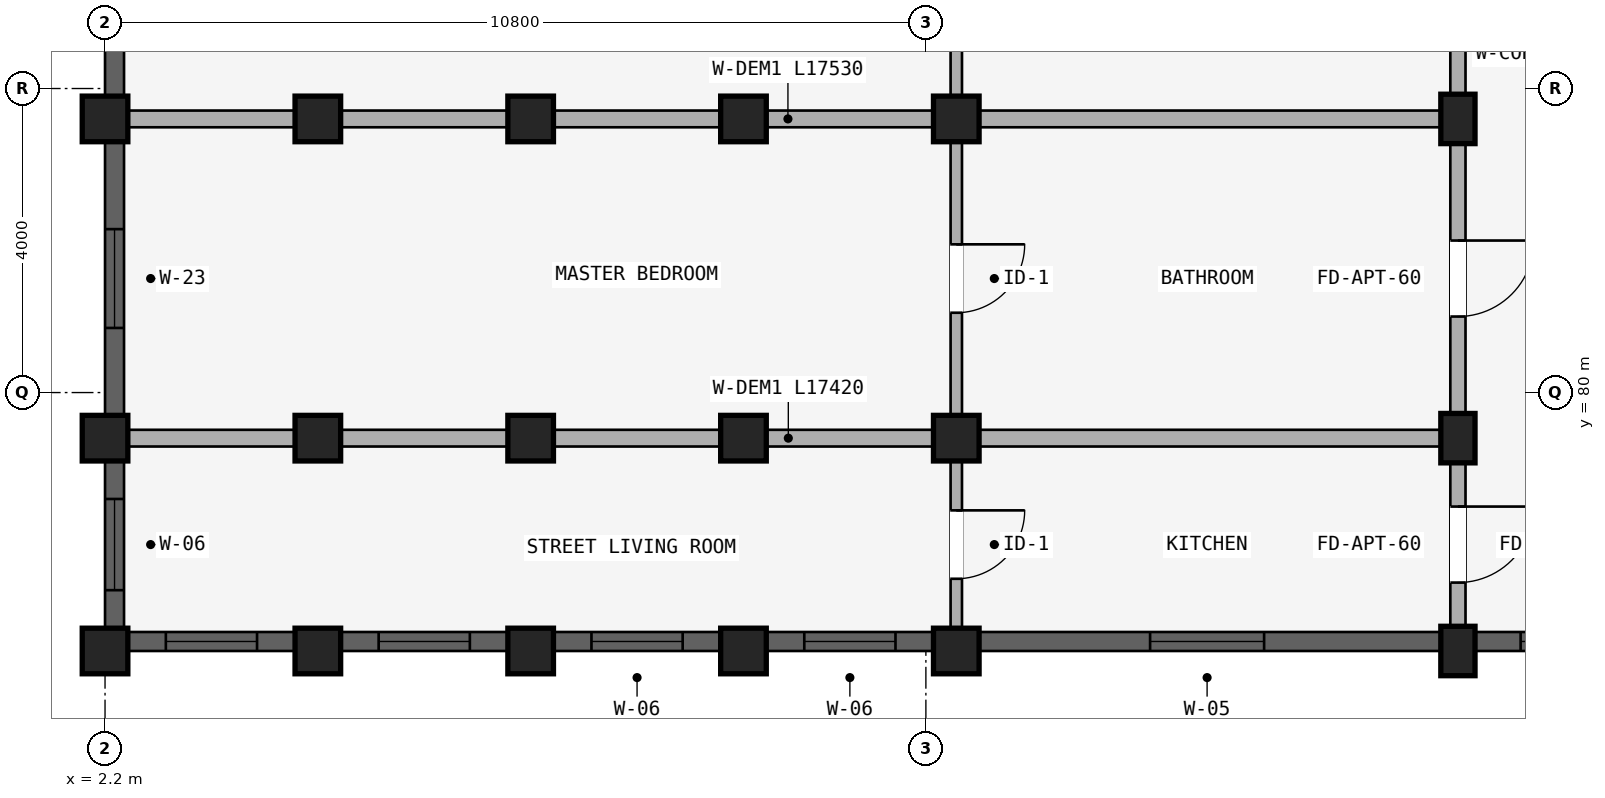
"""IFC4 building model, lengths in metres.
Left out: names, types, materials, properties, quantities, classifications, styles, units other than length and angle.
Written with IfcOpenShell. Run it as: python <this file> out.ifc"""

import sys

from ifc_helpers import new_model, si_unit, direction, frame, frame_2d, origin, origin_2d, place, context, subcontext, project, spatial, rectangle, extrude, element, fill, save


model = new_model("IFC4")
c1 = context("Model", 3, precision=1e-05, world=origin(), true_north=direction((0.0, 1.0)))
c2 = subcontext(c1, "Body", "Model", "MODEL_VIEW")
j1 = project(units=[si_unit("LENGTHUNIT", "METRE"), si_unit("PLANEANGLEUNIT", "RADIAN")], contexts=[c1])
p1 = place(None, origin())
s1 = spatial("IfcSite", under=j1, at=p1, CompositionType="ELEMENT")
p2 = place(p1, origin())
s2 = spatial("IfcBuilding", under=s1, at=p2, CompositionType="ELEMENT")
p3 = place(p2, frame((0.0, 0.0, 30.75)))
s3 = spatial("IfcBuildingStorey", under=s2, at=p3, CompositionType="ELEMENT", Elevation=30.75)
p4 = place(p3, frame((20.0, 83.6, 0.0), z_axis=(0.0, 0.0, 1.0), x_axis=(1.0, 0.0, 0.0)))
e1 = element("IfcColumn", 1, at=p4, inside=s3, PredefinedType="COLUMN", context=c2, shape_type="SweptSolid", body=[
    extrude(rectangle(XDim=0.45, YDim=0.65, at=origin_2d()), origin(), (0.0, 0.0, 1.0), 2.93),
])
for number, where, z_axis, x_axis in (
    (2, (13.4, 83.6, 0.0), (0.0, 0.0, 1.0), (1.0, 0.0, 0.0)),
    (3, (10.6, 83.6, 0.0), (0.0, 0.0, 1.0), (1.0, 0.0, 0.0)),
    (4, (7.8, 83.6, 0.0), (0.0, 0.0, 1.0), (1.0, 0.0, 0.0)),
    (5, (5.0, 83.6, 0.0), (0.0, 0.0, 1.0), (1.0, 0.0, 0.0)),
    (6, (2.2, 83.6, 0.0), (0.0, 0.0, 1.0), (1.0, 0.0, 0.0)),
):
    element("IfcColumn", number, at=place(p3, frame(where, z_axis=z_axis, x_axis=x_axis)), inside=s3, PredefinedType="COLUMN", context=c2, shape_type="SweptSolid", body=[
        extrude(rectangle(XDim=0.6, YDim=0.6, at=origin_2d()), origin(), (0.0, 0.0, 1.0), 2.93),
    ])
p5 = place(p3, frame((20.0, 79.4, 0.0), z_axis=(0.0, 0.0, 1.0), x_axis=(1.0, 0.0, 0.0)))
e7 = element("IfcColumn", 7, at=p5, inside=s3, PredefinedType="COLUMN", context=c2, shape_type="SweptSolid", body=[
    extrude(rectangle(XDim=0.45, YDim=0.65, at=origin_2d()), origin(), (0.0, 0.0, 1.0), 2.93),
])
for number, where, z_axis, x_axis in (
    (8, (13.4, 79.4, 0.0), (0.0, 0.0, 1.0), (1.0, 0.0, 0.0)),
    (9, (10.6, 79.4, 0.0), (0.0, 0.0, 1.0), (1.0, 0.0, 0.0)),
    (10, (7.8, 79.4, 0.0), (0.0, 0.0, 1.0), (1.0, 0.0, 0.0)),
    (11, (5.0, 79.4, 0.0), (0.0, 0.0, 1.0), (1.0, 0.0, 0.0)),
    (12, (2.2, 79.4, 0.0), (0.0, 0.0, 1.0), (1.0, 0.0, 0.0)),
):
    element("IfcColumn", number, at=place(p3, frame(where, z_axis=z_axis, x_axis=x_axis)), inside=s3, PredefinedType="COLUMN", context=c2, shape_type="SweptSolid", body=[
        extrude(rectangle(XDim=0.6, YDim=0.6, at=origin_2d()), origin(), (0.0, 0.0, 1.0), 2.93),
    ])
p6 = place(p3, frame((20.0, 76.6, 0.0), z_axis=(0.0, 0.0, 1.0), x_axis=(1.0, 0.0, 0.0)))
e13 = element("IfcColumn", 13, at=p6, inside=s3, PredefinedType="COLUMN", context=c2, shape_type="SweptSolid", body=[
    extrude(rectangle(XDim=0.45, YDim=0.65, at=origin_2d()), origin(), (0.0, 0.0, 1.0), 2.93),
])
for number, where, z_axis, x_axis in (
    (14, (13.4, 76.6, 0.0), (0.0, 0.0, 1.0), (1.0, 0.0, 0.0)),
    (15, (10.6, 76.6, 0.0), (0.0, 0.0, 1.0), (1.0, 0.0, 0.0)),
    (16, (7.8, 76.6, 0.0), (0.0, 0.0, 1.0), (1.0, 0.0, 0.0)),
    (17, (5.0, 76.6, 0.0), (0.0, 0.0, 1.0), (1.0, 0.0, 0.0)),
    (18, (2.2, 76.6, 0.0), (0.0, 0.0, 1.0), (1.0, 0.0, 0.0)),
):
    element("IfcColumn", number, at=place(p3, frame(where, z_axis=z_axis, x_axis=x_axis)), inside=s3, PredefinedType="COLUMN", context=c2, shape_type="SweptSolid", body=[
        extrude(rectangle(XDim=0.6, YDim=0.6, at=origin_2d()), origin(), (0.0, 0.0, 1.0), 2.93),
    ])
p7 = place(p3, frame((20.0, 87.65, 0.0), z_axis=(0.0, 0.0, 1.0), x_axis=(0.0, -1.0, 0.0)))
e19 = element("IfcWall", 19, at=p7, inside=s3, PredefinedType="STANDARD", context=c2, shape_type="SweptSolid", body=[
    extrude(rectangle(XDim=4.05, YDim=0.2, at=frame_2d((2.025, 0.0))), origin(), (0.0, 0.0, 1.0), 2.372),
])
p8 = place(p7, frame((1.525, 0.0, 0.0)))
e20 = element("IfcOpeningElement", 20, at=p8, cuts=e19, PredefinedType="OPENING", context=c2, shape_type="SweptSolid", body=[
    extrude(rectangle(XDim=1.0, YDim=2.15, at=frame_2d((0.5, 1.075))), frame((0.0, 0.11, 0.0), z_axis=(0.0, -1.0, 0.0), x_axis=(1.0, 0.0, 0.0)), (0.0, 0.0, 1.0), 0.22),
])
p9 = place(p3, frame((13.4, 87.57, 0.0), z_axis=(0.0, 0.0, 1.0), x_axis=(0.0, -1.0, 0.0)))
e21 = element("IfcWall", 21, at=p9, inside=s3, PredefinedType="PARTITIONING", context=c2, shape_type="SweptSolid", body=[
    extrude(rectangle(XDim=3.89, YDim=0.15, at=frame_2d((1.945, 0.0))), origin(), (0.0, 0.0, 1.0), 2.372),
])
p10 = place(p9, frame((1.495, 0.0, 0.0)))
e22 = element("IfcOpeningElement", 22, at=p10, cuts=e21, PredefinedType="OPENING", context=c2, shape_type="SweptSolid", body=[
    extrude(rectangle(XDim=0.9, YDim=2.1, at=frame_2d((0.45, 1.05))), frame((0.0, 0.085, 0.0), z_axis=(0.0, -1.0, 0.0), x_axis=(1.0, 0.0, 0.0)), (0.0, 0.0, 1.0), 0.17),
])
p11 = place(p3, frame((20.0, 83.6, 0.0), z_axis=(0.0, 0.0, 1.0), x_axis=(0.0, -1.0, 0.0)))
e23 = element("IfcWall", 23, at=p11, inside=s3, PredefinedType="STANDARD", context=c2, shape_type="SweptSolid", body=[
    extrude(rectangle(XDim=4.2, YDim=0.2, at=frame_2d((2.1, 0.0))), origin(), (0.0, 0.0, 1.0), 2.372),
])
p12 = place(p11, frame((1.6, 0.0, 0.0)))
e24 = element("IfcOpeningElement", 24, at=p12, cuts=e23, PredefinedType="OPENING", context=c2, shape_type="SweptSolid", body=[
    extrude(rectangle(XDim=1.0, YDim=2.15, at=frame_2d((0.5, 1.075))), frame((0.0, 0.11, 0.0), z_axis=(0.0, -1.0, 0.0), x_axis=(1.0, 0.0, 0.0)), (0.0, 0.0, 1.0), 0.22),
])
p13 = place(p3, frame((13.4, 83.52, 0.0), z_axis=(0.0, 0.0, 1.0), x_axis=(0.0, -1.0, 0.0)))
e25 = element("IfcWall", 25, at=p13, inside=s3, PredefinedType="PARTITIONING", context=c2, shape_type="SweptSolid", body=[
    extrude(rectangle(XDim=4.04, YDim=0.15, at=frame_2d((2.02, 0.0))), origin(), (0.0, 0.0, 1.0), 2.372),
])
p14 = place(p13, frame((1.57, 0.0, 0.0)))
e26 = element("IfcOpeningElement", 26, at=p14, cuts=e25, PredefinedType="OPENING", context=c2, shape_type="SweptSolid", body=[
    extrude(rectangle(XDim=0.9, YDim=2.1, at=frame_2d((0.45, 1.05))), frame((0.0, 0.085, 0.0), z_axis=(0.0, -1.0, 0.0), x_axis=(1.0, 0.0, 0.0)), (0.0, 0.0, 1.0), 0.17),
])
p15 = place(p3, frame((19.95, 83.6, 0.0), z_axis=(0.0, 0.0, 1.0), x_axis=(-1.0, 0.0, 0.0)))
e27 = element("IfcWall", 27, at=p15, inside=s3, PredefinedType="STANDARD", context=c2, shape_type="SweptSolid", body=[
    extrude(rectangle(XDim=17.53, YDim=0.22, at=frame_2d((8.765, 0.0))), origin(), (0.0, 0.0, 1.0), 2.372),
])
p16 = place(p3, frame((20.0, 79.4, 0.0), z_axis=(0.0, 0.0, 1.0), x_axis=(0.0, -1.0, 0.0)))
e28 = element("IfcWall", 28, at=p16, inside=s3, PredefinedType="STANDARD", context=c2, shape_type="SweptSolid", body=[
    extrude(rectangle(XDim=2.8, YDim=0.2, at=frame_2d((1.4, 0.0))), origin(), (0.0, 0.0, 1.0), 2.372),
])
p17 = place(p16, frame((0.9, 0.0, 0.0)))
e29 = element("IfcOpeningElement", 29, at=p17, cuts=e28, PredefinedType="OPENING", context=c2, shape_type="SweptSolid", body=[
    extrude(rectangle(XDim=1.0, YDim=2.15, at=frame_2d((0.5, 1.075))), frame((0.0, 0.11, 0.0), z_axis=(0.0, -1.0, 0.0), x_axis=(1.0, 0.0, 0.0)), (0.0, 0.0, 1.0), 0.22),
])
p18 = place(p3, frame((13.4, 79.32, 0.0), z_axis=(0.0, 0.0, 1.0), x_axis=(0.0, -1.0, 0.0)))
e30 = element("IfcWall", 30, at=p18, inside=s3, PredefinedType="PLUMBINGWALL", context=c2, shape_type="SweptSolid", body=[
    extrude(rectangle(XDim=2.64, YDim=0.15, at=frame_2d((1.32, 0.0))), origin(), (0.0, 0.0, 1.0), 2.372),
])
p19 = place(p18, frame((0.87, 0.0, 0.0)))
e31 = element("IfcOpeningElement", 31, at=p19, cuts=e30, PredefinedType="OPENING", context=c2, shape_type="SweptSolid", body=[
    extrude(rectangle(XDim=0.9, YDim=2.1, at=frame_2d((0.45, 1.05))), frame((0.0, 0.085, 0.0), z_axis=(0.0, -1.0, 0.0), x_axis=(1.0, 0.0, 0.0)), (0.0, 0.0, 1.0), 0.17),
])
p20 = place(p3, frame((19.9, 79.4, 0.0), z_axis=(0.0, 0.0, 1.0), x_axis=(-1.0, 0.0, 0.0)))
e32 = element("IfcWall", 32, at=p20, inside=s3, PredefinedType="STANDARD", context=c2, shape_type="SweptSolid", body=[
    extrude(rectangle(XDim=17.42, YDim=0.22, at=frame_2d((8.71, 0.0))), origin(), (0.0, 0.0, 1.0), 2.372),
])
p21 = place(p3, frame((2.325, 87.497, 0.0), z_axis=(0.0, 0.0, 1.0), x_axis=(0.0, -1.0, 0.0)))
e33 = element("IfcWall", 33, at=p21, inside=s3, PredefinedType="STANDARD", context=c2, shape_type="SweptSolid", body=[
    extrude(rectangle(XDim=3.593, YDim=0.25, at=frame_2d((1.796, 0.0))), origin(), (0.0, 0.0, 1.0), 2.472),
])
p22 = place(p21, frame((1.146, 0.0, 0.88)))
e34 = element("IfcOpeningElement", 34, at=p22, cuts=e33, PredefinedType="OPENING", context=c2, shape_type="SweptSolid", body=[
    extrude(rectangle(XDim=1.3, YDim=1.4, at=frame_2d((0.65, 0.7))), frame((0.0, 0.135, 0.0), z_axis=(0.0, -1.0, 0.0), x_axis=(1.0, 0.0, 0.0)), (0.0, 0.0, 1.0), 0.27),
])
p23 = place(p3, frame((2.325, 83.296, 0.0), z_axis=(0.0, 0.0, 1.0), x_axis=(0.0, -1.0, 0.0)))
e35 = element("IfcWall", 35, at=p23, inside=s3, PredefinedType="STANDARD", context=c2, shape_type="SweptSolid", body=[
    extrude(rectangle(XDim=3.593, YDim=0.25, at=frame_2d((1.796, 0.0))), origin(), (0.0, 0.0, 1.0), 2.472),
])
p24 = place(p23, frame((1.146, 0.0, 0.88)))
e36 = element("IfcOpeningElement", 36, at=p24, cuts=e35, PredefinedType="OPENING", context=c2, shape_type="SweptSolid", body=[
    extrude(rectangle(XDim=1.3, YDim=1.4, at=frame_2d((0.65, 0.7))), frame((0.0, 0.135, 0.0), z_axis=(0.0, -1.0, 0.0), x_axis=(1.0, 0.0, 0.0)), (0.0, 0.0, 1.0), 0.27),
])
p25 = place(p3, frame((2.325, 79.096, 0.0), z_axis=(0.0, 0.0, 1.0), x_axis=(0.0, -1.0, 0.0)))
e37 = element("IfcWall", 37, at=p25, inside=s3, PredefinedType="STANDARD", context=c2, shape_type="SweptSolid", body=[
    extrude(rectangle(XDim=2.193, YDim=0.25, at=frame_2d((1.096, 0.0))), origin(), (0.0, 0.0, 1.0), 2.472),
])
p26 = place(p25, frame((0.497, 0.0, 0.772)))
e38 = element("IfcOpeningElement", 38, at=p26, cuts=e37, PredefinedType="OPENING", context=c2, shape_type="SweptSolid", body=[
    extrude(rectangle(XDim=1.2, YDim=1.5, at=frame_2d((0.6, 0.75))), frame((0.0, 0.135, 0.0), z_axis=(0.0, -1.0, 0.0), x_axis=(1.0, 0.0, 0.0)), (0.0, 0.0, 1.0), 0.27),
])
p27 = place(p3, frame((22.171, 76.725, 0.0), z_axis=(0.0, 0.0, 1.0), x_axis=(-1.0, 0.0, 0.0)))
e39 = element("IfcWall", 39, at=p27, inside=s3, PredefinedType="STANDARD", context=c2, shape_type="SweptSolid", body=[
    extrude(rectangle(XDim=1.943, YDim=0.25, at=frame_2d((0.971, 0.0))), origin(), (0.0, 0.0, 1.0), 2.372),
])
p28 = place(p27, frame((0.596, 0.0, 0.88)))
e40 = element("IfcOpeningElement", 40, at=p28, cuts=e39, PredefinedType="OPENING", context=c2, shape_type="SweptSolid", body=[
    extrude(rectangle(XDim=0.75, YDim=1.05, at=frame_2d((0.375, 0.525))), frame((0.0, 0.135, 0.0), z_axis=(0.0, -1.0, 0.0), x_axis=(1.0, 0.0, 0.0)), (0.0, 0.0, 1.0), 0.27),
])
p29 = place(p3, frame((19.771, 76.725, 0.0), z_axis=(0.0, 0.0, 1.0), x_axis=(-1.0, 0.0, 0.0)))
e41 = element("IfcWall", 41, at=p29, inside=s3, PredefinedType="STANDARD", context=c2, shape_type="SweptSolid", body=[
    extrude(rectangle(XDim=6.068, YDim=0.25, at=frame_2d((3.034, 0.0))), origin(), (0.0, 0.0, 1.0), 2.372),
])
p30 = place(p29, frame((2.322, 0.0, 0.522)))
e42 = element("IfcOpeningElement", 42, at=p30, cuts=e41, PredefinedType="OPENING", context=c2, shape_type="SweptSolid", body=[
    extrude(rectangle(XDim=1.5, YDim=1.65, at=frame_2d((0.75, 0.825))), frame((0.0, 0.135, 0.0), z_axis=(0.0, -1.0, 0.0), x_axis=(1.0, 0.0, 0.0)), (0.0, 0.0, 1.0), 0.27),
])
p31 = place(p3, frame((13.096, 76.725, 0.0), z_axis=(0.0, 0.0, 1.0), x_axis=(-1.0, 0.0, 0.0)))
e43 = element("IfcWall", 43, at=p31, inside=s3, PredefinedType="STANDARD", context=c2, shape_type="SweptSolid", body=[
    extrude(rectangle(XDim=2.193, YDim=0.25, at=frame_2d((1.096, 0.0))), origin(), (0.0, 0.0, 1.0), 2.372),
])
p32 = place(p31, frame((0.497, 0.0, 0.672)))
e44 = element("IfcOpeningElement", 44, at=p32, cuts=e43, PredefinedType="OPENING", context=c2, shape_type="SweptSolid", body=[
    extrude(rectangle(XDim=1.2, YDim=1.5, at=frame_2d((0.6, 0.75))), frame((0.0, 0.135, 0.0), z_axis=(0.0, -1.0, 0.0), x_axis=(1.0, 0.0, 0.0)), (0.0, 0.0, 1.0), 0.27),
])
p33 = place(p3, frame((10.296, 76.725, 0.0), z_axis=(0.0, 0.0, 1.0), x_axis=(-1.0, 0.0, 0.0)))
e45 = element("IfcWall", 45, at=p33, inside=s3, PredefinedType="STANDARD", context=c2, shape_type="SweptSolid", body=[
    extrude(rectangle(XDim=2.193, YDim=0.25, at=frame_2d((1.096, 0.0))), origin(), (0.0, 0.0, 1.0), 2.372),
])
p34 = place(p33, frame((0.497, 0.0, 0.672)))
e46 = element("IfcOpeningElement", 46, at=p34, cuts=e45, PredefinedType="OPENING", context=c2, shape_type="SweptSolid", body=[
    extrude(rectangle(XDim=1.2, YDim=1.5, at=frame_2d((0.6, 0.75))), frame((0.0, 0.135, 0.0), z_axis=(0.0, -1.0, 0.0), x_axis=(1.0, 0.0, 0.0)), (0.0, 0.0, 1.0), 0.27),
])
p35 = place(p3, frame((7.497, 76.725, 0.0), z_axis=(0.0, 0.0, 1.0), x_axis=(-1.0, 0.0, 0.0)))
e47 = element("IfcWall", 47, at=p35, inside=s3, PredefinedType="STANDARD", context=c2, shape_type="SweptSolid", body=[
    extrude(rectangle(XDim=2.193, YDim=0.25, at=frame_2d((1.097, 0.0))), origin(), (0.0, 0.0, 1.0), 2.372),
])
p36 = place(p35, frame((0.497, 0.0, 0.672)))
e48 = element("IfcOpeningElement", 48, at=p36, cuts=e47, PredefinedType="OPENING", context=c2, shape_type="SweptSolid", body=[
    extrude(rectangle(XDim=1.2, YDim=1.5, at=frame_2d((0.6, 0.75))), frame((0.0, 0.135, 0.0), z_axis=(0.0, -1.0, 0.0), x_axis=(1.0, 0.0, 0.0)), (0.0, 0.0, 1.0), 0.27),
])
p37 = place(p3, frame((4.697, 76.725, 0.0), z_axis=(0.0, 0.0, 1.0), x_axis=(-1.0, 0.0, 0.0)))
e49 = element("IfcWall", 49, at=p37, inside=s3, PredefinedType="STANDARD", context=c2, shape_type="SweptSolid", body=[
    extrude(rectangle(XDim=2.193, YDim=0.25, at=frame_2d((1.097, 0.0))), origin(), (0.0, 0.0, 1.0), 2.372),
])
p38 = place(p37, frame((0.497, 0.0, 0.672)))
e50 = element("IfcOpeningElement", 50, at=p38, cuts=e49, PredefinedType="OPENING", context=c2, shape_type="SweptSolid", body=[
    extrude(rectangle(XDim=1.2, YDim=1.5, at=frame_2d((0.6, 0.75))), frame((0.0, 0.135, 0.0), z_axis=(0.0, -1.0, 0.0), x_axis=(1.0, 0.0, 0.0)), (0.0, 0.0, 1.0), 0.27),
])
p39 = place(p24, origin())
e51 = element("IfcWindow", 51, at=p39, inside=s3, PartitioningType="DOUBLE_PANEL_HORIZONTAL", PredefinedType="WINDOW", context=c2, shape_type="SweptSolid", body=[
    extrude(rectangle(XDim=1.3, YDim=1.4, at=frame_2d((0.65, 0.7))), frame((0.0, 0.03, 0.0), z_axis=(0.0, -1.0, 0.0), x_axis=(1.0, 0.0, 0.0)), (0.0, 0.0, 1.0), 0.06),
])
fill(e36, e51)
p40 = place(p26, origin())
e52 = element("IfcWindow", 52, at=p40, inside=s3, PartitioningType="SINGLE_PANEL", PredefinedType="WINDOW", context=c2, shape_type="SweptSolid", body=[
    extrude(rectangle(XDim=1.2, YDim=1.5, at=frame_2d((0.6, 0.75))), frame((0.0, 0.03, 0.0), z_axis=(0.0, -1.0, 0.0), x_axis=(1.0, 0.0, 0.0)), (0.0, 0.0, 1.0), 0.06),
])
fill(e38, e52)
p41 = place(p28, origin())
e53 = element("IfcWindow", 53, at=p41, inside=s3, PartitioningType="SINGLE_PANEL", PredefinedType="WINDOW", context=c2, shape_type="SweptSolid", body=[
    extrude(rectangle(XDim=0.75, YDim=1.05, at=frame_2d((0.375, 0.525))), frame((0.0, 0.03, 0.0), z_axis=(0.0, -1.0, 0.0), x_axis=(1.0, 0.0, 0.0)), (0.0, 0.0, 1.0), 0.06),
])
fill(e40, e53)
p42 = place(p30, origin())
e54 = element("IfcWindow", 54, at=p42, inside=s3, PartitioningType="DOUBLE_PANEL_VERTICAL", PredefinedType="WINDOW", context=c2, shape_type="SweptSolid", body=[
    extrude(rectangle(XDim=1.5, YDim=1.65, at=frame_2d((0.75, 0.825))), frame((0.0, 0.03, 0.0), z_axis=(0.0, -1.0, 0.0), x_axis=(1.0, 0.0, 0.0)), (0.0, 0.0, 1.0), 0.06),
])
fill(e42, e54)
p43 = place(p32, origin())
e55 = element("IfcWindow", 55, at=p43, inside=s3, PartitioningType="SINGLE_PANEL", PredefinedType="WINDOW", context=c2, shape_type="SweptSolid", body=[
    extrude(rectangle(XDim=1.2, YDim=1.5, at=frame_2d((0.6, 0.75))), frame((0.0, 0.03, 0.0), z_axis=(0.0, -1.0, 0.0), x_axis=(1.0, 0.0, 0.0)), (0.0, 0.0, 1.0), 0.06),
])
fill(e44, e55)
p44 = place(p34, origin())
e56 = element("IfcWindow", 56, at=p44, inside=s3, PartitioningType="SINGLE_PANEL", PredefinedType="WINDOW", context=c2, shape_type="SweptSolid", body=[
    extrude(rectangle(XDim=1.2, YDim=1.5, at=frame_2d((0.6, 0.75))), frame((0.0, 0.03, 0.0), z_axis=(0.0, -1.0, 0.0), x_axis=(1.0, 0.0, 0.0)), (0.0, 0.0, 1.0), 0.06),
])
fill(e46, e56)
p45 = place(p36, origin())
e57 = element("IfcWindow", 57, at=p45, inside=s3, PartitioningType="SINGLE_PANEL", PredefinedType="WINDOW", context=c2, shape_type="SweptSolid", body=[
    extrude(rectangle(XDim=1.2, YDim=1.5, at=frame_2d((0.6, 0.75))), frame((0.0, 0.03, 0.0), z_axis=(0.0, -1.0, 0.0), x_axis=(1.0, 0.0, 0.0)), (0.0, 0.0, 1.0), 0.06),
])
fill(e48, e57)
p46 = place(p38, origin())
e58 = element("IfcWindow", 58, at=p46, inside=s3, PartitioningType="SINGLE_PANEL", PredefinedType="WINDOW", context=c2, shape_type="SweptSolid", body=[
    extrude(rectangle(XDim=1.2, YDim=1.5, at=frame_2d((0.6, 0.75))), frame((0.0, 0.03, 0.0), z_axis=(0.0, -1.0, 0.0), x_axis=(1.0, 0.0, 0.0)), (0.0, 0.0, 1.0), 0.06),
])
fill(e50, e58)
p47 = place(p12, origin())
e59 = element("IfcDoor", 59, at=p47, inside=s3, OperationType="SINGLE_SWING_LEFT", PredefinedType="DOOR", context=c2, shape_type="SweptSolid", body=[
    extrude(rectangle(XDim=1.0, YDim=2.15, at=frame_2d((0.5, 1.075))), frame((0.0, 0.025, 0.0), z_axis=(0.0, -1.0, 0.0), x_axis=(1.0, 0.0, 0.0)), (0.0, 0.0, 1.0), 0.05),
])
fill(e24, e59)
p48 = place(p14, frame((0.9, 0.0, 0.0), z_axis=(0.0, 0.0, 1.0), x_axis=(-1.0, 0.0, 0.0)))
e60 = element("IfcDoor", 60, at=p48, inside=s3, OperationType="SINGLE_SWING_RIGHT", PredefinedType="DOOR", context=c2, shape_type="SweptSolid", body=[
    extrude(rectangle(XDim=0.9, YDim=2.1, at=frame_2d((0.45, 1.05))), frame((0.0, 0.025, 0.0), z_axis=(0.0, -1.0, 0.0), x_axis=(1.0, 0.0, 0.0)), (0.0, 0.0, 1.0), 0.05),
])
fill(e26, e60)
p49 = place(p19, frame((0.9, 0.0, 0.0), z_axis=(0.0, 0.0, 1.0), x_axis=(-1.0, 0.0, 0.0)))
e61 = element("IfcDoor", 61, at=p49, inside=s3, OperationType="SINGLE_SWING_RIGHT", PredefinedType="DOOR", context=c2, shape_type="SweptSolid", body=[
    extrude(rectangle(XDim=0.9, YDim=2.1, at=frame_2d((0.45, 1.05))), frame((0.0, 0.025, 0.0), z_axis=(0.0, -1.0, 0.0), x_axis=(1.0, 0.0, 0.0)), (0.0, 0.0, 1.0), 0.05),
])
fill(e31, e61)
p50 = place(p17, origin())
e62 = element("IfcDoor", 62, at=p50, inside=s3, OperationType="SINGLE_SWING_LEFT", PredefinedType="DOOR", context=c2, shape_type="SweptSolid", body=[
    extrude(rectangle(XDim=1.0, YDim=2.15, at=frame_2d((0.5, 1.075))), frame((0.0, 0.025, 0.0), z_axis=(0.0, -1.0, 0.0), x_axis=(1.0, 0.0, 0.0)), (0.0, 0.0, 1.0), 0.05),
])
fill(e29, e62)
save(model, sys.argv[1])
